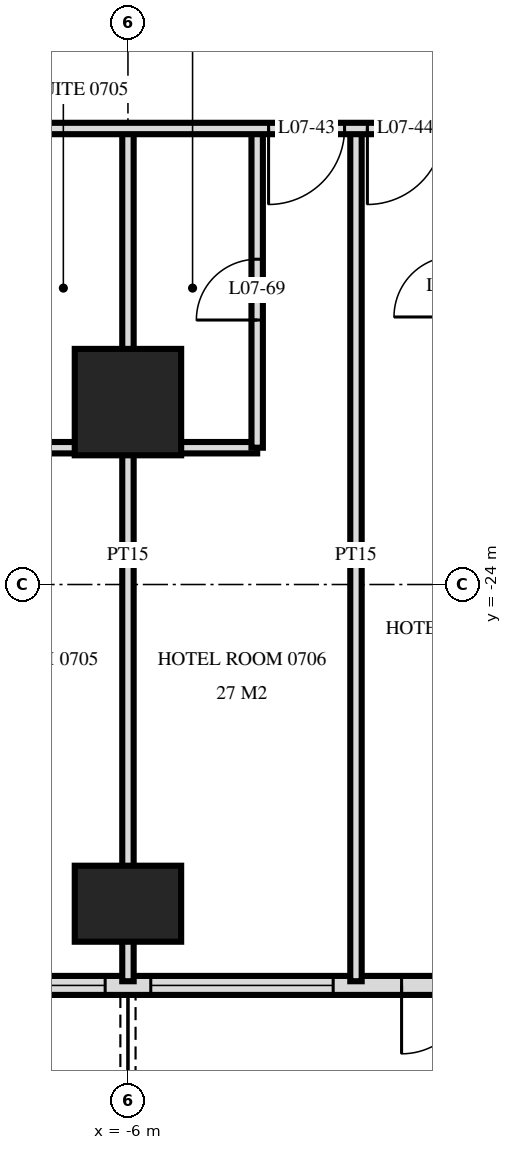
"""IFC4 building model, lengths in metres.
Left out: names, types, materials, properties, quantities, classifications, styles, units other than length and angle.
Written with IfcOpenShell. Run it as: python <this file> out.ifc"""

import sys

from ifc_helpers import new_model, si_unit, direction, frame, frame_2d, origin, origin_2d, place, context, subcontext, project, spatial, rectangle, extrude, element, fill, save


model = new_model("IFC4")
c1 = context("Model", 3, precision=1e-05, world=origin(), true_north=direction((0.0, 1.0)))
c2 = subcontext(c1, "Body", "Model", "MODEL_VIEW")
j1 = project(units=[si_unit("LENGTHUNIT", "METRE"), si_unit("PLANEANGLEUNIT", "RADIAN")], contexts=[c1])
p1 = place(None, origin())
s1 = spatial("IfcSite", under=j1, at=p1, CompositionType="ELEMENT")
p2 = place(p1, origin())
s2 = spatial("IfcBuilding", under=s1, at=p2, CompositionType="ELEMENT")
p3 = place(p2, frame((0.0, 0.0, 34.8)))
s3 = spatial("IfcBuildingStorey", under=s2, at=p3, CompositionType="ELEMENT", Elevation=34.8)
p4 = place(p3, frame((-6.0, -28.2, 0.0), z_axis=(0.0, 0.0, 1.0), x_axis=(1.0, 0.0, 0.0)))
e1 = element("IfcColumn", 1, at=p4, inside=s3, PredefinedType="COLUMN", context=c2, shape_type="SweptSolid", body=[
    extrude(rectangle(XDim=1.4, YDim=1.0, at=origin_2d()), origin(), (0.0, 0.0, 1.0), 3.6),
])
p5 = place(p3, frame((-6.0, -21.6, 0.0), z_axis=(0.0, 0.0, 1.0), x_axis=(1.0, 0.0, 0.0)))
e2 = element("IfcColumn", 2, at=p5, inside=s3, PredefinedType="COLUMN", context=c2, shape_type="SweptSolid", body=[
    extrude(rectangle(XDim=1.4, YDim=1.4, at=origin_2d()), origin(), (0.0, 0.0, 1.0), 3.6),
])
p6 = place(p3, frame((-28.775, -29.275, 0.0), z_axis=(0.0, 0.0, 1.0), x_axis=(1.0, 0.0, 0.0)))
e3 = element("IfcWall", 3, at=p6, inside=s3, PredefinedType="SOLIDWALL", context=c2, shape_type="SweptSolid", body=[
    extrude(rectangle(XDim=57.551, YDim=0.25, at=frame_2d((28.775, 0.0))), origin(), (0.0, 0.0, 1.0), 3.32),
])
p7 = place(p6, frame((0.575, 0.0, 0.0)))
e4 = element("IfcOpeningElement", 4, at=p7, cuts=e3, PredefinedType="OPENING", context=c2, shape_type="SweptSolid", body=[
    extrude(rectangle(XDim=1.8, YDim=2.4, at=frame_2d((0.9, 1.2))), frame((0.0, 0.135, 0.0), z_axis=(0.0, -1.0, 0.0), x_axis=(1.0, 0.0, 0.0)), (0.0, 0.0, 1.0), 0.27),
])
p8 = place(p6, frame((5.375, 0.0, 0.0)))
e5 = element("IfcOpeningElement", 5, at=p8, cuts=e3, PredefinedType="OPENING", context=c2, shape_type="SweptSolid", body=[
    extrude(rectangle(XDim=1.8, YDim=2.4, at=frame_2d((0.9, 1.2))), frame((0.0, 0.135, 0.0), z_axis=(0.0, -1.0, 0.0), x_axis=(1.0, 0.0, 0.0)), (0.0, 0.0, 1.0), 0.27),
])
p9 = place(p6, frame((8.075, 0.0, 0.3)))
e6 = element("IfcOpeningElement", 6, at=p9, cuts=e3, PredefinedType="OPENING", context=c2, shape_type="SweptSolid", body=[
    extrude(rectangle(XDim=2.4, YDim=2.1, at=frame_2d((1.2, 1.05))), frame((0.0, 0.135, 0.0), z_axis=(0.0, -1.0, 0.0), x_axis=(1.0, 0.0, 0.0)), (0.0, 0.0, 1.0), 0.27),
])
p10 = place(p6, frame((11.375, 0.0, 0.0)))
e7 = element("IfcOpeningElement", 7, at=p10, cuts=e3, PredefinedType="OPENING", context=c2, shape_type="SweptSolid", body=[
    extrude(rectangle(XDim=1.8, YDim=2.4, at=frame_2d((0.9, 1.2))), frame((0.0, 0.135, 0.0), z_axis=(0.0, -1.0, 0.0), x_axis=(1.0, 0.0, 0.0)), (0.0, 0.0, 1.0), 0.27),
])
p11 = place(p6, frame((14.075, 0.0, 0.3)))
e8 = element("IfcOpeningElement", 8, at=p11, cuts=e3, PredefinedType="OPENING", context=c2, shape_type="SweptSolid", body=[
    extrude(rectangle(XDim=2.4, YDim=2.1, at=frame_2d((1.2, 1.05))), frame((0.0, 0.135, 0.0), z_axis=(0.0, -1.0, 0.0), x_axis=(1.0, 0.0, 0.0)), (0.0, 0.0, 1.0), 0.27),
])
p12 = place(p6, frame((17.375, 0.0, 0.0)))
e9 = element("IfcOpeningElement", 9, at=p12, cuts=e3, PredefinedType="OPENING", context=c2, shape_type="SweptSolid", body=[
    extrude(rectangle(XDim=1.8, YDim=2.4, at=frame_2d((0.9, 1.2))), frame((0.0, 0.135, 0.0), z_axis=(0.0, -1.0, 0.0), x_axis=(1.0, 0.0, 0.0)), (0.0, 0.0, 1.0), 0.27),
])
p13 = place(p6, frame((20.075, 0.0, 0.3)))
e10 = element("IfcOpeningElement", 10, at=p13, cuts=e3, PredefinedType="OPENING", context=c2, shape_type="SweptSolid", body=[
    extrude(rectangle(XDim=2.4, YDim=2.1, at=frame_2d((1.2, 1.05))), frame((0.0, 0.135, 0.0), z_axis=(0.0, -1.0, 0.0), x_axis=(1.0, 0.0, 0.0)), (0.0, 0.0, 1.0), 0.27),
])
p14 = place(p6, frame((23.075, 0.0, 0.3)))
e11 = element("IfcOpeningElement", 11, at=p14, cuts=e3, PredefinedType="OPENING", context=c2, shape_type="SweptSolid", body=[
    extrude(rectangle(XDim=2.4, YDim=2.1, at=frame_2d((1.2, 1.05))), frame((0.0, 0.135, 0.0), z_axis=(0.0, -1.0, 0.0), x_axis=(1.0, 0.0, 0.0)), (0.0, 0.0, 1.0), 0.27),
])
p15 = place(p6, frame((26.375, 0.0, 0.0)))
e12 = element("IfcOpeningElement", 12, at=p15, cuts=e3, PredefinedType="OPENING", context=c2, shape_type="SweptSolid", body=[
    extrude(rectangle(XDim=1.8, YDim=2.4, at=frame_2d((0.9, 1.2))), frame((0.0, 0.135, 0.0), z_axis=(0.0, -1.0, 0.0), x_axis=(1.0, 0.0, 0.0)), (0.0, 0.0, 1.0), 0.27),
])
p16 = place(p6, frame((29.375, 0.0, 0.0)))
e13 = element("IfcOpeningElement", 13, at=p16, cuts=e3, PredefinedType="OPENING", context=c2, shape_type="SweptSolid", body=[
    extrude(rectangle(XDim=1.8, YDim=2.4, at=frame_2d((0.9, 1.2))), frame((0.0, 0.135, 0.0), z_axis=(0.0, -1.0, 0.0), x_axis=(1.0, 0.0, 0.0)), (0.0, 0.0, 1.0), 0.27),
])
p17 = place(p6, frame((32.075, 0.0, 0.3)))
e14 = element("IfcOpeningElement", 14, at=p17, cuts=e3, PredefinedType="OPENING", context=c2, shape_type="SweptSolid", body=[
    extrude(rectangle(XDim=2.4, YDim=2.1, at=frame_2d((1.2, 1.05))), frame((0.0, 0.135, 0.0), z_axis=(0.0, -1.0, 0.0), x_axis=(1.0, 0.0, 0.0)), (0.0, 0.0, 1.0), 0.27),
])
p18 = place(p6, frame((35.375, 0.0, 0.0)))
e15 = element("IfcOpeningElement", 15, at=p18, cuts=e3, PredefinedType="OPENING", context=c2, shape_type="SweptSolid", body=[
    extrude(rectangle(XDim=1.8, YDim=2.4, at=frame_2d((0.9, 1.2))), frame((0.0, 0.135, 0.0), z_axis=(0.0, -1.0, 0.0), x_axis=(1.0, 0.0, 0.0)), (0.0, 0.0, 1.0), 0.27),
])
p19 = place(p6, frame((38.075, 0.0, 0.3)))
e16 = element("IfcOpeningElement", 16, at=p19, cuts=e3, PredefinedType="OPENING", context=c2, shape_type="SweptSolid", body=[
    extrude(rectangle(XDim=2.4, YDim=2.1, at=frame_2d((1.2, 1.05))), frame((0.0, 0.135, 0.0), z_axis=(0.0, -1.0, 0.0), x_axis=(1.0, 0.0, 0.0)), (0.0, 0.0, 1.0), 0.27),
])
p20 = place(p6, frame((41.375, 0.0, 0.0)))
e17 = element("IfcOpeningElement", 17, at=p20, cuts=e3, PredefinedType="OPENING", context=c2, shape_type="SweptSolid", body=[
    extrude(rectangle(XDim=1.8, YDim=2.4, at=frame_2d((0.9, 1.2))), frame((0.0, 0.135, 0.0), z_axis=(0.0, -1.0, 0.0), x_axis=(1.0, 0.0, 0.0)), (0.0, 0.0, 1.0), 0.27),
])
p21 = place(p6, frame((44.075, 0.0, 0.3)))
e18 = element("IfcOpeningElement", 18, at=p21, cuts=e3, PredefinedType="OPENING", context=c2, shape_type="SweptSolid", body=[
    extrude(rectangle(XDim=2.4, YDim=2.1, at=frame_2d((1.2, 1.05))), frame((0.0, 0.135, 0.0), z_axis=(0.0, -1.0, 0.0), x_axis=(1.0, 0.0, 0.0)), (0.0, 0.0, 1.0), 0.27),
])
p22 = place(p6, frame((47.375, 0.0, 0.0)))
e19 = element("IfcOpeningElement", 19, at=p22, cuts=e3, PredefinedType="OPENING", context=c2, shape_type="SweptSolid", body=[
    extrude(rectangle(XDim=1.8, YDim=2.4, at=frame_2d((0.9, 1.2))), frame((0.0, 0.135, 0.0), z_axis=(0.0, -1.0, 0.0), x_axis=(1.0, 0.0, 0.0)), (0.0, 0.0, 1.0), 0.27),
])
p23 = place(p6, frame((50.075, 0.0, 0.3)))
e20 = element("IfcOpeningElement", 20, at=p23, cuts=e3, PredefinedType="OPENING", context=c2, shape_type="SweptSolid", body=[
    extrude(rectangle(XDim=2.4, YDim=2.1, at=frame_2d((1.2, 1.05))), frame((0.0, 0.135, 0.0), z_axis=(0.0, -1.0, 0.0), x_axis=(1.0, 0.0, 0.0)), (0.0, 0.0, 1.0), 0.27),
])
p24 = place(p6, frame((53.375, 0.0, 0.0)))
e21 = element("IfcOpeningElement", 21, at=p24, cuts=e3, PredefinedType="OPENING", context=c2, shape_type="SweptSolid", body=[
    extrude(rectangle(XDim=1.8, YDim=2.4, at=frame_2d((0.9, 1.2))), frame((0.0, 0.135, 0.0), z_axis=(0.0, -1.0, 0.0), x_axis=(1.0, 0.0, 0.0)), (0.0, 0.0, 1.0), 0.27),
])
p25 = place(p3, frame((-3.0, -29.22, 0.0), z_axis=(0.0, 0.0, 1.0), x_axis=(0.0, 1.0, 0.0)))
e22 = element("IfcWall", 22, at=p25, inside=s3, PredefinedType="PARTITIONING", context=c2, shape_type="SweptSolid", body=[
    extrude(rectangle(XDim=11.22, YDim=0.15, at=frame_2d((5.61, 0.0))), origin(), (0.0, 0.0, 1.0), 3.32),
])
p26 = place(p3, frame((-4.3, -22.2, 0.0), z_axis=(0.0, 0.0, 1.0), x_axis=(0.0, 1.0, 0.0)))
e23 = element("IfcWall", 23, at=p26, inside=s3, PredefinedType="PARTITIONING", context=c2, shape_type="SweptSolid", body=[
    extrude(rectangle(XDim=4.2, YDim=0.15, at=frame_2d((2.1, 0.0))), origin(), (0.0, 0.0, 1.0), 3.32),
])
p27 = place(p26, frame((1.68, 0.0, 0.0)))
e24 = element("IfcOpeningElement", 24, at=p27, cuts=e23, PredefinedType="OPENING", context=c2, shape_type="SweptSolid", body=[
    extrude(rectangle(XDim=0.8, YDim=2.1, at=frame_2d((0.4, 1.05))), frame((0.0, 0.085, 0.0), z_axis=(0.0, -1.0, 0.0), x_axis=(1.0, 0.0, 0.0)), (0.0, 0.0, 1.0), 0.17),
])
p28 = place(p3, frame((-6.0, -29.22, 0.0), z_axis=(0.0, 0.0, 1.0), x_axis=(0.0, 1.0, 0.0)))
e25 = element("IfcWall", 25, at=p28, inside=s3, PredefinedType="PARTITIONING", context=c2, shape_type="SweptSolid", body=[
    extrude(rectangle(XDim=11.22, YDim=0.15, at=frame_2d((5.61, 0.0))), origin(), (0.0, 0.0, 1.0), 3.32),
])
p29 = place(p3, frame((-7.7, -22.2, 0.0), z_axis=(0.0, 0.0, 1.0), x_axis=(1.0, 0.0, 0.0)))
e26 = element("IfcWall", 26, at=p29, inside=s3, PredefinedType="PARTITIONING", context=c2, shape_type="SweptSolid", body=[
    extrude(rectangle(XDim=3.4, YDim=0.15, at=frame_2d((1.7, 0.0))), origin(), (0.0, 0.0, 1.0), 3.32),
])
p30 = place(p3, frame((-33.12, -18.0, 0.0), z_axis=(0.0, 0.0, 1.0), x_axis=(1.0, 0.0, 0.0)))
e27 = element("IfcWall", 27, at=p30, inside=s3, PredefinedType="PARTITIONING", context=c2, shape_type="SweptSolid", body=[
    extrude(rectangle(XDim=66.24, YDim=0.15, at=frame_2d((33.12, 0.0))), origin(), (0.0, 0.0, 1.0), 3.32),
])
p31 = place(p30, frame((12.27, 0.0, 0.0)))
e28 = element("IfcOpeningElement", 28, at=p31, cuts=e27, PredefinedType="OPENING", context=c2, shape_type="SweptSolid", body=[
    extrude(rectangle(XDim=1.0, YDim=2.1, at=frame_2d((0.5, 1.05))), frame((0.0, 0.085, 0.0), z_axis=(0.0, -1.0, 0.0), x_axis=(1.0, 0.0, 0.0)), (0.0, 0.0, 1.0), 0.17),
])
p32 = place(p30, frame((16.97, 0.0, 0.0)))
e29 = element("IfcOpeningElement", 29, at=p32, cuts=e27, PredefinedType="OPENING", context=c2, shape_type="SweptSolid", body=[
    extrude(rectangle(XDim=1.0, YDim=2.1, at=frame_2d((0.5, 1.05))), frame((0.0, 0.085, 0.0), z_axis=(0.0, -1.0, 0.0), x_axis=(1.0, 0.0, 0.0)), (0.0, 0.0, 1.0), 0.17),
])
p33 = place(p30, frame((18.27, 0.0, 0.0)))
e30 = element("IfcOpeningElement", 30, at=p33, cuts=e27, PredefinedType="OPENING", context=c2, shape_type="SweptSolid", body=[
    extrude(rectangle(XDim=1.0, YDim=2.1, at=frame_2d((0.5, 1.05))), frame((0.0, 0.085, 0.0), z_axis=(0.0, -1.0, 0.0), x_axis=(1.0, 0.0, 0.0)), (0.0, 0.0, 1.0), 0.17),
])
p34 = place(p30, frame((22.97, 0.0, 0.0)))
e31 = element("IfcOpeningElement", 31, at=p34, cuts=e27, PredefinedType="OPENING", context=c2, shape_type="SweptSolid", body=[
    extrude(rectangle(XDim=1.0, YDim=2.1, at=frame_2d((0.5, 1.05))), frame((0.0, 0.085, 0.0), z_axis=(0.0, -1.0, 0.0), x_axis=(1.0, 0.0, 0.0)), (0.0, 0.0, 1.0), 0.17),
])
p35 = place(p30, frame((24.27, 0.0, 0.0)))
e32 = element("IfcOpeningElement", 32, at=p35, cuts=e27, PredefinedType="OPENING", context=c2, shape_type="SweptSolid", body=[
    extrude(rectangle(XDim=1.0, YDim=2.1, at=frame_2d((0.5, 1.05))), frame((0.0, 0.085, 0.0), z_axis=(0.0, -1.0, 0.0), x_axis=(1.0, 0.0, 0.0)), (0.0, 0.0, 1.0), 0.17),
])
p36 = place(p30, frame((28.97, 0.0, 0.0)))
e33 = element("IfcOpeningElement", 33, at=p36, cuts=e27, PredefinedType="OPENING", context=c2, shape_type="SweptSolid", body=[
    extrude(rectangle(XDim=1.0, YDim=2.1, at=frame_2d((0.5, 1.05))), frame((0.0, 0.085, 0.0), z_axis=(0.0, -1.0, 0.0), x_axis=(1.0, 0.0, 0.0)), (0.0, 0.0, 1.0), 0.17),
])
p37 = place(p30, frame((30.27, 0.0, 0.0)))
e34 = element("IfcOpeningElement", 34, at=p37, cuts=e27, PredefinedType="OPENING", context=c2, shape_type="SweptSolid", body=[
    extrude(rectangle(XDim=1.0, YDim=2.1, at=frame_2d((0.5, 1.05))), frame((0.0, 0.085, 0.0), z_axis=(0.0, -1.0, 0.0), x_axis=(1.0, 0.0, 0.0)), (0.0, 0.0, 1.0), 0.17),
])
p38 = place(p30, frame((34.97, 0.0, 0.0)))
e35 = element("IfcOpeningElement", 35, at=p38, cuts=e27, PredefinedType="OPENING", context=c2, shape_type="SweptSolid", body=[
    extrude(rectangle(XDim=1.0, YDim=2.1, at=frame_2d((0.5, 1.05))), frame((0.0, 0.085, 0.0), z_axis=(0.0, -1.0, 0.0), x_axis=(1.0, 0.0, 0.0)), (0.0, 0.0, 1.0), 0.17),
])
p39 = place(p30, frame((37.27, 0.0, 0.0)))
e36 = element("IfcOpeningElement", 36, at=p39, cuts=e27, PredefinedType="OPENING", context=c2, shape_type="SweptSolid", body=[
    extrude(rectangle(XDim=1.0, YDim=2.1, at=frame_2d((0.5, 1.05))), frame((0.0, 0.085, 0.0), z_axis=(0.0, -1.0, 0.0), x_axis=(1.0, 0.0, 0.0)), (0.0, 0.0, 1.0), 0.17),
])
p40 = place(p30, frame((43.97, 0.0, 0.0)))
e37 = element("IfcOpeningElement", 37, at=p40, cuts=e27, PredefinedType="OPENING", context=c2, shape_type="SweptSolid", body=[
    extrude(rectangle(XDim=1.0, YDim=2.1, at=frame_2d((0.5, 1.05))), frame((0.0, 0.085, 0.0), z_axis=(0.0, -1.0, 0.0), x_axis=(1.0, 0.0, 0.0)), (0.0, 0.0, 1.0), 0.17),
])
p41 = place(p30, frame((45.27, 0.0, 0.0)))
e38 = element("IfcOpeningElement", 38, at=p41, cuts=e27, PredefinedType="OPENING", context=c2, shape_type="SweptSolid", body=[
    extrude(rectangle(XDim=1.0, YDim=2.1, at=frame_2d((0.5, 1.05))), frame((0.0, 0.085, 0.0), z_axis=(0.0, -1.0, 0.0), x_axis=(1.0, 0.0, 0.0)), (0.0, 0.0, 1.0), 0.17),
])
p42 = place(p30, frame((51.22, 0.0, 0.0)))
e39 = element("IfcOpeningElement", 39, at=p42, cuts=e27, PredefinedType="OPENING", context=c2, shape_type="SweptSolid", body=[
    extrude(rectangle(XDim=1.0, YDim=2.1, at=frame_2d((0.5, 1.05))), frame((0.0, 0.085, 0.0), z_axis=(0.0, -1.0, 0.0), x_axis=(1.0, 0.0, 0.0)), (0.0, 0.0, 1.0), 0.17),
])
p43 = place(p30, frame((54.27, 0.0, 0.0)))
e40 = element("IfcOpeningElement", 40, at=p43, cuts=e27, PredefinedType="OPENING", context=c2, shape_type="SweptSolid", body=[
    extrude(rectangle(XDim=1.0, YDim=2.1, at=frame_2d((0.5, 1.05))), frame((0.0, 0.085, 0.0), z_axis=(0.0, -1.0, 0.0), x_axis=(1.0, 0.0, 0.0)), (0.0, 0.0, 1.0), 0.17),
])
p44 = place(p30, frame((6.07, 0.0, 0.0)))
e41 = element("IfcOpeningElement", 41, at=p44, cuts=e27, PredefinedType="OPENING", context=c2, shape_type="SweptSolid", body=[
    extrude(rectangle(XDim=1.0, YDim=2.1, at=frame_2d((0.5, 1.05))), frame((0.0, 0.085, 0.0), z_axis=(0.0, -1.0, 0.0), x_axis=(1.0, 0.0, 0.0)), (0.0, 0.0, 1.0), 0.17),
])
p45 = place(p30, frame((63.37, 0.0, 0.0)))
e42 = element("IfcOpeningElement", 42, at=p45, cuts=e27, PredefinedType="OPENING", context=c2, shape_type="SweptSolid", body=[
    extrude(rectangle(XDim=1.0, YDim=2.1, at=frame_2d((0.5, 1.05))), frame((0.0, 0.085, 0.0), z_axis=(0.0, -1.0, 0.0), x_axis=(1.0, 0.0, 0.0)), (0.0, 0.0, 1.0), 0.17),
])
p46 = place(p13, origin())
e43 = element("IfcWindow", 43, at=p46, inside=s3, PartitioningType="SINGLE_PANEL", PredefinedType="WINDOW", context=c2, shape_type="SweptSolid", body=[
    extrude(rectangle(XDim=2.4, YDim=2.1, at=frame_2d((1.2, 1.05))), frame((0.0, 0.03, 0.0), z_axis=(0.0, -1.0, 0.0), x_axis=(1.0, 0.0, 0.0)), (0.0, 0.0, 1.0), 0.06),
])
fill(e10, e43)
p47 = place(p14, origin())
e44 = element("IfcWindow", 44, at=p47, inside=s3, PartitioningType="SINGLE_PANEL", PredefinedType="WINDOW", context=c2, shape_type="SweptSolid", body=[
    extrude(rectangle(XDim=2.4, YDim=2.1, at=frame_2d((1.2, 1.05))), frame((0.0, 0.03, 0.0), z_axis=(0.0, -1.0, 0.0), x_axis=(1.0, 0.0, 0.0)), (0.0, 0.0, 1.0), 0.06),
])
fill(e11, e44)
p48 = place(p15, frame((0.9, 0.0, 0.0), z_axis=(0.0, 0.0, 1.0), x_axis=(-1.0, 0.0, 0.0)))
e45 = element("IfcDoor", 45, at=p48, inside=s3, OperationType="DOUBLE_DOOR_SINGLE_SWING", PredefinedType="DOOR", context=c2, shape_type="SweptSolid", body=[
    extrude(rectangle(XDim=1.8, YDim=2.4, at=frame_2d((0.0, 1.2))), frame((0.0, -0.025, 0.0), z_axis=(0.0, 1.0, 0.0), x_axis=(-1.0, 0.0, 0.0)), (0.0, 0.0, 1.0), 0.05),
])
fill(e12, e45)
p49 = place(p36, frame((0.5, 0.0, 0.0), z_axis=(0.0, 0.0, 1.0), x_axis=(-1.0, 0.0, 0.0)))
e46 = element("IfcDoor", 46, at=p49, inside=s3, OperationType="SINGLE_SWING_LEFT", PredefinedType="DOOR", context=c2, shape_type="SweptSolid", body=[
    extrude(rectangle(XDim=1.0, YDim=2.1, at=frame_2d((0.0, 1.05))), frame((0.0, -0.025, 0.0), z_axis=(0.0, 1.0, 0.0), x_axis=(-1.0, 0.0, 0.0)), (0.0, 0.0, 1.0), 0.05),
])
fill(e33, e46)
p50 = place(p37, frame((0.5, 0.0, 0.0), z_axis=(0.0, 0.0, 1.0), x_axis=(-1.0, 0.0, 0.0)))
e47 = element("IfcDoor", 47, at=p50, inside=s3, OperationType="SINGLE_SWING_LEFT", PredefinedType="DOOR", context=c2, shape_type="SweptSolid", body=[
    extrude(rectangle(XDim=1.0, YDim=2.1, at=frame_2d((0.0, 1.05))), frame((0.0, -0.025, 0.0), z_axis=(0.0, 1.0, 0.0), x_axis=(-1.0, 0.0, 0.0)), (0.0, 0.0, 1.0), 0.05),
])
fill(e34, e47)
p51 = place(p27, origin())
e48 = element("IfcDoor", 48, at=p51, inside=s3, OperationType="SINGLE_SWING_RIGHT", PredefinedType="DOOR", context=c2, shape_type="SweptSolid", body=[
    extrude(rectangle(XDim=0.8, YDim=2.1, at=frame_2d((0.4, 1.05))), frame((0.0, 0.025, 0.0), z_axis=(0.0, -1.0, 0.0), x_axis=(1.0, 0.0, 0.0)), (0.0, 0.0, 1.0), 0.05),
])
fill(e24, e48)
save(model, sys.argv[1])
